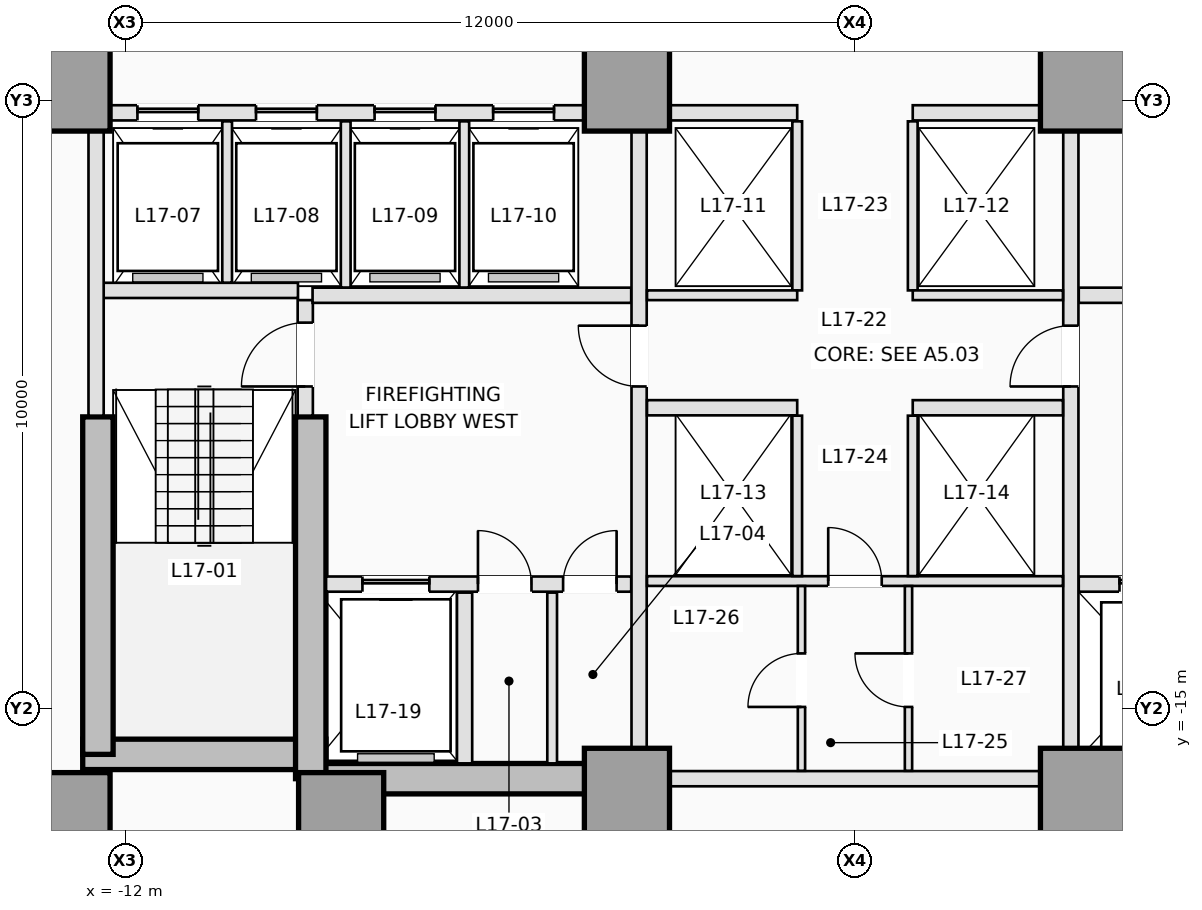
"""IFC4 building model, lengths in metres.
Left out: names, types, materials, properties, quantities, classifications, styles, units other than length and angle.
Written with IfcOpenShell. Run it as: python <this file> out.ifc"""

import sys

from ifc_helpers import new_model, si_unit, direction, frame, frame_2d, origin, origin_2d, place, context, subcontext, project, spatial, rectangle, extrude, element, fill, save


model = new_model("IFC4")
c1 = context("Model", 3, precision=1e-05, world=origin(), true_north=direction((0.0, 1.0)))
c2 = subcontext(c1, "Body", "Model", "MODEL_VIEW")
j1 = project(units=[si_unit("LENGTHUNIT", "METRE"), si_unit("PLANEANGLEUNIT", "RADIAN")], contexts=[c1])
p1 = place(None, origin())
s1 = spatial("IfcSite", under=j1, at=p1, CompositionType="ELEMENT")
p2 = place(p1, origin())
s2 = spatial("IfcBuilding", under=s1, at=p2, CompositionType="ELEMENT")
p3 = place(p2, frame((0.0, 0.0, 66.1)))
s3 = spatial("IfcBuildingStorey", under=s2, at=p3, CompositionType="ELEMENT", Elevation=66.1)
p4 = place(p3, frame((-12.7, -15.75, 0.0), z_axis=(0.0, 0.0, 1.0), x_axis=(1.0, 0.0, 0.0)))
e1 = element("IfcWall", 1, at=p4, inside=s3, PredefinedType="SHEAR", context=c2, shape_type="SweptSolid", body=[
    extrude(rectangle(XDim=4.0, YDim=0.5, at=frame_2d((2.0, 0.0))), origin(), (0.0, 0.0, 1.0), 3.5),
])
for number, where, z_axis, x_axis in (
    (2, (-8.95, -16.15, 0.0), (0.0, 0.0, 1.0), (1.0, 0.0, 0.0)),
    (3, (3.75, -16.15, 0.0), (0.0, 0.0, 1.0), (1.0, 0.0, 0.0)),
):
    element("IfcWall", number, at=place(p3, frame(where, z_axis=z_axis, x_axis=x_axis)), inside=s3, PredefinedType="SHEAR", context=c2, shape_type="SweptSolid", body=[
        extrude(rectangle(XDim=5.2, YDim=0.5, at=frame_2d((2.6, 0.0))), origin(), (0.0, 0.0, 1.0), 3.5),
    ])
p5 = place(p3, frame((-12.45, -15.75, 0.0), z_axis=(0.0, 0.0, 1.0), x_axis=(0.0, 1.0, 0.0)))
e4 = element("IfcWall", 4, at=p5, inside=s3, PredefinedType="SHEAR", context=c2, shape_type="SweptSolid", body=[
    extrude(rectangle(XDim=5.55, YDim=0.5, at=frame_2d((2.775, 0.0))), origin(), (0.0, 0.0, 1.0), 3.5),
])
p6 = place(p3, frame((-8.95, -16.15, 0.0), z_axis=(0.0, 0.0, 1.0), x_axis=(0.0, 1.0, 0.0)))
e5 = element("IfcWall", 5, at=p6, inside=s3, PredefinedType="SHEAR", context=c2, shape_type="SweptSolid", body=[
    extrude(rectangle(XDim=5.95, YDim=0.5, at=frame_2d((2.975, 0.0))), origin(), (0.0, 0.0, 1.0), 3.5),
])
for number, where, z_axis, x_axis in (
    (6, (-12.95, -16.75, 0.0), (0.0, 0.0, 1.0), (1.0, 0.0, 0.0)),
    (7, (-8.45, -16.75, 0.0), (0.0, 0.0, 1.0), (1.0, 0.0, 0.0)),
    (8, (-3.75, -16.35, 0.0), (0.0, 0.0, 1.0), (1.0, 0.0, 0.0)),
    (9, (3.75, -16.35, 0.0), (0.0, 0.0, 1.0), (1.0, 0.0, 0.0)),
    (10, (-12.95, -4.8, 0.0), (0.0, 0.0, 1.0), (1.0, 0.0, 0.0)),
    (11, (-3.75, -4.8, 0.0), (0.0, 0.0, 1.0), (1.0, 0.0, 0.0)),
    (12, (3.75, -4.8, 0.0), (0.0, 0.0, 1.0), (1.0, 0.0, 0.0)),
):
    element("IfcColumn", number, at=place(p3, frame(where, z_axis=z_axis, x_axis=x_axis)), inside=s3, PredefinedType="COLUMN", context=c2, shape_type="SweptSolid", body=[
        extrude(rectangle(XDim=1.4, YDim=1.4, at=origin_2d()), origin(), (0.0, 0.0, 1.0), 3.5),
    ])
p7 = place(p3, frame((-9.04, -10.18, 0.0), z_axis=(0.0, 0.0, 1.0), x_axis=(0.0, 1.0, 0.0)))
e13 = element("IfcWall", 13, at=p7, inside=s3, PredefinedType="PARTITIONING", context=c2, shape_type="SweptSolid", body=[
    extrude(rectangle(XDim=1.9, YDim=0.25, at=frame_2d((0.95, 0.0))), origin(), (0.0, 0.0, 1.0), 3.25),
])
p8 = place(p7, frame((0.48, 0.0, 0.0)))
e14 = element("IfcOpeningElement", 14, at=p8, cuts=e13, PredefinedType="OPENING", context=c2, shape_type="SweptSolid", body=[
    extrude(rectangle(XDim=1.05, YDim=2.15, at=frame_2d((0.525, 1.075))), frame((0.0, 0.135, 0.0), z_axis=(0.0, -1.0, 0.0), x_axis=(1.0, 0.0, 0.0)), (0.0, 0.0, 1.0), 0.27),
])
p9 = place(p3, frame((-12.38, -8.12, 0.0), z_axis=(0.0, 0.0, 1.0), x_axis=(1.0, 0.0, 0.0)))
e15 = element("IfcWall", 15, at=p9, inside=s3, PredefinedType="PARTITIONING", context=c2, shape_type="SweptSolid", body=[
    extrude(rectangle(XDim=3.22, YDim=0.25, at=frame_2d((1.61, 0.0))), origin(), (0.0, 0.0, 1.0), 3.25),
])
p10 = place(p3, frame((-12.48, -10.18, 0.0), z_axis=(0.0, 0.0, 1.0), x_axis=(0.0, 1.0, 0.0)))
e16 = element("IfcWall", 16, at=p10, inside=s3, PredefinedType="PARTITIONING", context=c2, shape_type="SweptSolid", body=[
    extrude(rectangle(XDim=4.678, YDim=0.25, at=frame_2d((2.339, 0.0))), origin(), (0.0, 0.0, 1.0), 3.25),
])
p11 = place(p3, frame((-8.698, -12.95, 0.0), z_axis=(0.0, 0.0, 1.0), x_axis=(1.0, 0.0, 0.0)))
e17 = element("IfcWall", 17, at=p11, inside=s3, PredefinedType="PARTITIONING", context=c2, shape_type="SweptSolid", body=[
    extrude(rectangle(XDim=5.018, YDim=0.25, at=frame_2d((2.509, 0.0))), origin(), (0.0, 0.0, 1.0), 3.25),
])
p12 = place(p11, frame((0.598, 0.0, 0.0)))
e18 = element("IfcOpeningElement", 18, at=p12, cuts=e17, PredefinedType="OPENING", context=c2, shape_type="SweptSolid", body=[
    extrude(rectangle(XDim=1.1, YDim=2.15, at=frame_2d((0.55, 1.075))), frame((0.0, 0.135, 0.0), z_axis=(0.0, -1.0, 0.0), x_axis=(1.0, 0.0, 0.0)), (0.0, 0.0, 1.0), 0.27),
])
p13 = place(p11, frame((2.498, 0.0, 0.0)))
e19 = element("IfcOpeningElement", 19, at=p13, cuts=e17, PredefinedType="OPENING", context=c2, shape_type="SweptSolid", body=[
    extrude(rectangle(XDim=0.88, YDim=2.1, at=frame_2d((0.44, 1.05))), frame((0.0, 0.135, 0.0), z_axis=(0.0, -1.0, 0.0), x_axis=(1.0, 0.0, 0.0)), (0.0, 0.0, 1.0), 0.27),
])
p14 = place(p11, frame((3.898, 0.0, 0.0)))
e20 = element("IfcOpeningElement", 20, at=p14, cuts=e17, PredefinedType="OPENING", context=c2, shape_type="SweptSolid", body=[
    extrude(rectangle(XDim=0.88, YDim=2.1, at=frame_2d((0.44, 1.05))), frame((0.0, 0.135, 0.0), z_axis=(0.0, -1.0, 0.0), x_axis=(1.0, 0.0, 0.0)), (0.0, 0.0, 1.0), 0.27),
])
p15 = place(p3, frame((3.68, -12.95, 0.0), z_axis=(0.0, 0.0, 1.0), x_axis=(1.0, 0.0, 0.0)))
e21 = element("IfcWall", 21, at=p15, inside=s3, PredefinedType="PARTITIONING", context=c2, shape_type="SweptSolid", body=[
    extrude(rectangle(XDim=5.018, YDim=0.25, at=frame_2d((2.509, 0.0))), origin(), (0.0, 0.0, 1.0), 3.25),
])
p16 = place(p15, frame((3.32, 0.0, 0.0)))
e22 = element("IfcOpeningElement", 22, at=p16, cuts=e21, PredefinedType="OPENING", context=c2, shape_type="SweptSolid", body=[
    extrude(rectangle(XDim=1.1, YDim=2.15, at=frame_2d((0.55, 1.075))), frame((0.0, 0.135, 0.0), z_axis=(0.0, -1.0, 0.0), x_axis=(1.0, 0.0, 0.0)), (0.0, 0.0, 1.0), 0.27),
])
p17 = place(p15, frame((0.67, 0.0, 0.0)))
e23 = element("IfcOpeningElement", 23, at=p17, cuts=e21, PredefinedType="OPENING", context=c2, shape_type="SweptSolid", body=[
    extrude(rectangle(XDim=1.2, YDim=2.15, at=frame_2d((0.6, 1.075))), frame((0.0, 0.135, 0.0), z_axis=(0.0, -1.0, 0.0), x_axis=(1.0, 0.0, 0.0)), (0.0, 0.0, 1.0), 0.27),
])
p18 = place(p3, frame((-6.42, -15.898, 0.0), z_axis=(0.0, 0.0, 1.0), x_axis=(0.0, 1.0, 0.0)))
e24 = element("IfcWall", 24, at=p18, inside=s3, PredefinedType="PARTITIONING", context=c2, shape_type="SweptSolid", body=[
    extrude(rectangle(XDim=2.808, YDim=0.25, at=frame_2d((1.404, 0.0))), origin(), (0.0, 0.0, 1.0), 3.25),
])
p19 = place(p3, frame((-4.98, -15.898, 0.0), z_axis=(0.0, 0.0, 1.0), x_axis=(0.0, 1.0, 0.0)))
e25 = element("IfcWall", 25, at=p19, inside=s3, PredefinedType="PARTITIONING", context=c2, shape_type="SweptSolid", body=[
    extrude(rectangle(XDim=2.808, YDim=0.16, at=frame_2d((1.404, 0.0))), origin(), (0.0, 0.0, 1.0), 3.25),
])
for number, where, z_axis, x_axis in (
    (26, (-8.92, -8.2, 0.0), (0.0, 0.0, 1.0), (1.0, 0.0, 0.0)),
    (27, (3.68, -8.2, 0.0), (0.0, 0.0, 1.0), (1.0, 0.0, 0.0)),
):
    element("IfcWall", number, at=place(p3, frame(where, z_axis=z_axis, x_axis=x_axis)), inside=s3, PredefinedType="PARTITIONING", context=c2, shape_type="SweptSolid", body=[
        extrude(rectangle(XDim=5.24, YDim=0.25, at=frame_2d((2.62, 0.0))), origin(), (0.0, 0.0, 1.0), 3.25),
    ])
p20 = place(p3, frame((-3.55, -15.648, 0.0), z_axis=(0.0, 0.0, 1.0), x_axis=(0.0, 1.0, 0.0)))
e28 = element("IfcWall", 28, at=p20, inside=s3, PredefinedType="PARTITIONING", context=c2, shape_type="SweptSolid", body=[
    extrude(rectangle(XDim=10.146, YDim=0.25, at=frame_2d((5.073, 0.0))), origin(), (0.0, 0.0, 1.0), 3.25),
])
p21 = place(p20, frame((5.948, 0.0, 0.0)))
e29 = element("IfcOpeningElement", 29, at=p21, cuts=e28, PredefinedType="OPENING", context=c2, shape_type="SweptSolid", body=[
    extrude(rectangle(XDim=1.0, YDim=2.15, at=frame_2d((0.5, 1.075))), frame((0.0, 0.135, 0.0), z_axis=(0.0, -1.0, 0.0), x_axis=(1.0, 0.0, 0.0)), (0.0, 0.0, 1.0), 0.27),
])
p22 = place(p3, frame((3.55, -15.648, 0.0), z_axis=(0.0, 0.0, 1.0), x_axis=(0.0, 1.0, 0.0)))
e30 = element("IfcWall", 30, at=p22, inside=s3, PredefinedType="PARTITIONING", context=c2, shape_type="SweptSolid", body=[
    extrude(rectangle(XDim=10.146, YDim=0.25, at=frame_2d((5.073, 0.0))), origin(), (0.0, 0.0, 1.0), 3.25),
])
p23 = place(p22, frame((5.948, 0.0, 0.0)))
e31 = element("IfcOpeningElement", 31, at=p23, cuts=e30, PredefinedType="OPENING", context=c2, shape_type="SweptSolid", body=[
    extrude(rectangle(XDim=1.0, YDim=2.15, at=frame_2d((0.5, 1.075))), frame((0.0, 0.135, 0.0), z_axis=(0.0, -1.0, 0.0), x_axis=(1.0, 0.0, 0.0)), (0.0, 0.0, 1.0), 0.27),
])
p24 = place(p3, frame((-12.248, -5.2, 0.0), z_axis=(0.0, 0.0, 1.0), x_axis=(1.0, 0.0, 0.0)))
e32 = element("IfcWall", 32, at=p24, inside=s3, PredefinedType="PARTITIONING", context=c2, shape_type="SweptSolid", body=[
    extrude(rectangle(XDim=7.796, YDim=0.25, at=frame_2d((3.898, 0.0))), origin(), (0.0, 0.0, 1.0), 3.25),
])
p25 = place(p24, frame((0.448, 0.0, 0.0)))
e33 = element("IfcOpeningElement", 33, at=p25, cuts=e32, PredefinedType="OPENING", context=c2, shape_type="SweptSolid", body=[
    extrude(rectangle(XDim=1.0, YDim=2.15, at=frame_2d((0.5, 1.075))), frame((0.0, 0.135, 0.0), z_axis=(0.0, -1.0, 0.0), x_axis=(1.0, 0.0, 0.0)), (0.0, 0.0, 1.0), 0.27),
])
p26 = place(p24, frame((2.398, 0.0, 0.0)))
e34 = element("IfcOpeningElement", 34, at=p26, cuts=e32, PredefinedType="OPENING", context=c2, shape_type="SweptSolid", body=[
    extrude(rectangle(XDim=1.0, YDim=2.15, at=frame_2d((0.5, 1.075))), frame((0.0, 0.135, 0.0), z_axis=(0.0, -1.0, 0.0), x_axis=(1.0, 0.0, 0.0)), (0.0, 0.0, 1.0), 0.27),
])
p27 = place(p24, frame((4.348, 0.0, 0.0)))
e35 = element("IfcOpeningElement", 35, at=p27, cuts=e32, PredefinedType="OPENING", context=c2, shape_type="SweptSolid", body=[
    extrude(rectangle(XDim=1.0, YDim=2.15, at=frame_2d((0.5, 1.075))), frame((0.0, 0.135, 0.0), z_axis=(0.0, -1.0, 0.0), x_axis=(1.0, 0.0, 0.0)), (0.0, 0.0, 1.0), 0.27),
])
p28 = place(p24, frame((6.298, 0.0, 0.0)))
e36 = element("IfcOpeningElement", 36, at=p28, cuts=e32, PredefinedType="OPENING", context=c2, shape_type="SweptSolid", body=[
    extrude(rectangle(XDim=1.0, YDim=2.15, at=frame_2d((0.5, 1.075))), frame((0.0, 0.135, 0.0), z_axis=(0.0, -1.0, 0.0), x_axis=(1.0, 0.0, 0.0)), (0.0, 0.0, 1.0), 0.27),
])
for number, where, z_axis, x_axis in (
    (37, (-3.048, -5.2, 0.0), (0.0, 0.0, 1.0), (1.0, 0.0, 0.0)),
    (38, (0.95, -5.2, 0.0), (0.0, 0.0, 1.0), (1.0, 0.0, 0.0)),
):
    element("IfcWall", number, at=place(p3, frame(where, z_axis=z_axis, x_axis=x_axis)), inside=s3, PredefinedType="PARTITIONING", context=c2, shape_type="SweptSolid", body=[
        extrude(rectangle(XDim=2.098, YDim=0.25, at=frame_2d((1.049, 0.0))), origin(), (0.0, 0.0, 1.0), 3.25),
    ])
p29 = place(p3, frame((-10.325, -7.993, 0.0), z_axis=(0.0, 0.0, 1.0), x_axis=(0.0, 1.0, 0.0)))
e39 = element("IfcWall", 39, at=p29, inside=s3, PredefinedType="PARTITIONING", context=c2, shape_type="SweptSolid", body=[
    extrude(rectangle(XDim=2.653, YDim=0.16, at=frame_2d((1.326, 0.0))), origin(), (0.0, 0.0, 1.0), 3.25),
])
for number, where, z_axis, x_axis in (
    (40, (-8.375, -8.073, 0.0), (0.0, 0.0, 1.0), (0.0, 1.0, 0.0)),
    (41, (-6.425, -8.073, 0.0), (0.0, 0.0, 1.0), (0.0, 1.0, 0.0)),
):
    element("IfcWall", number, at=place(p3, frame(where, z_axis=z_axis, x_axis=x_axis)), inside=s3, PredefinedType="PARTITIONING", context=c2, shape_type="SweptSolid", body=[
        extrude(rectangle(XDim=2.733, YDim=0.16, at=frame_2d((1.366, 0.0))), origin(), (0.0, 0.0, 1.0), 3.25),
    ])
p30 = place(p3, frame((-3.048, -16.15, 0.0), z_axis=(0.0, 0.0, 1.0), x_axis=(1.0, 0.0, 0.0)))
e42 = element("IfcWall", 42, at=p30, inside=s3, PredefinedType="PARTITIONING", context=c2, shape_type="SweptSolid", body=[
    extrude(rectangle(XDim=6.096, YDim=0.25, at=frame_2d((3.048, 0.0))), origin(), (0.0, 0.0, 1.0), 2.3),
])
for number, where, z_axis, x_axis in (
    (43, (-0.95, -8.12, 0.0), (0.0, 0.0, 1.0), (0.0, 1.0, 0.0)),
    (44, (0.95, -8.12, 0.0), (0.0, 0.0, 1.0), (0.0, 1.0, 0.0)),
):
    element("IfcWall", number, at=place(p3, frame(where, z_axis=z_axis, x_axis=x_axis)), inside=s3, PredefinedType="PARTITIONING", context=c2, shape_type="SweptSolid", body=[
        extrude(rectangle(XDim=2.78, YDim=0.16, at=frame_2d((1.39, 0.0))), origin(), (0.0, 0.0, 1.0), 3.25),
    ])
for number, where, z_axis, x_axis in (
    (45, (-3.42, -8.2, 0.0), (0.0, 0.0, 1.0), (1.0, 0.0, 0.0)),
    (46, (0.95, -8.2, 0.0), (0.0, 0.0, 1.0), (1.0, 0.0, 0.0)),
):
    element("IfcWall", number, at=place(p3, frame(where, z_axis=z_axis, x_axis=x_axis)), inside=s3, PredefinedType="PARTITIONING", context=c2, shape_type="SweptSolid", body=[
        extrude(rectangle(XDim=2.47, YDim=0.16, at=frame_2d((1.235, 0.0))), origin(), (0.0, 0.0, 1.0), 3.25),
    ])
for number, where, z_axis, x_axis in (
    (47, (-3.42, -10.05, 0.0), (0.0, 0.0, 1.0), (1.0, 0.0, 0.0)),
    (48, (0.95, -10.05, 0.0), (0.0, 0.0, 1.0), (1.0, 0.0, 0.0)),
):
    element("IfcWall", number, at=place(p3, frame(where, z_axis=z_axis, x_axis=x_axis)), inside=s3, PredefinedType="PARTITIONING", context=c2, shape_type="SweptSolid", body=[
        extrude(rectangle(XDim=2.47, YDim=0.25, at=frame_2d((1.235, 0.0))), origin(), (0.0, 0.0, 1.0), 3.25),
    ])
p31 = place(p3, frame((-3.42, -12.9, 0.0), z_axis=(0.0, 0.0, 1.0), x_axis=(1.0, 0.0, 0.0)))
e49 = element("IfcWall", 49, at=p31, inside=s3, PredefinedType="PARTITIONING", context=c2, shape_type="SweptSolid", body=[
    extrude(rectangle(XDim=6.84, YDim=0.16, at=frame_2d((3.42, 0.0))), origin(), (0.0, 0.0, 1.0), 3.25),
])
p32 = place(p31, frame((2.98, 0.0, 0.0)))
e50 = element("IfcOpeningElement", 50, at=p32, cuts=e49, PredefinedType="OPENING", context=c2, shape_type="SweptSolid", body=[
    extrude(rectangle(XDim=0.88, YDim=2.12, at=frame_2d((0.44, 1.06))), frame((0.0, 0.09, 0.0), z_axis=(0.0, -1.0, 0.0), x_axis=(1.0, 0.0, 0.0)), (0.0, 0.0, 1.0), 0.18),
])
for number, where, z_axis, x_axis in (
    (51, (-0.95, -12.818, 0.0), (0.0, 0.0, 1.0), (0.0, 1.0, 0.0)),
    (52, (0.95, -12.818, 0.0), (0.0, 0.0, 1.0), (0.0, 1.0, 0.0)),
):
    element("IfcWall", number, at=place(p3, frame(where, z_axis=z_axis, x_axis=x_axis)), inside=s3, PredefinedType="PARTITIONING", context=c2, shape_type="SweptSolid", body=[
        extrude(rectangle(XDim=2.638, YDim=0.16, at=frame_2d((1.319, 0.0))), origin(), (0.0, 0.0, 1.0), 3.25),
    ])
p33 = place(p3, frame((-0.88, -16.02, 0.0), z_axis=(0.0, 0.0, 1.0), x_axis=(0.0, 1.0, 0.0)))
e53 = element("IfcWall", 53, at=p33, inside=s3, PredefinedType="PARTITIONING", context=c2, shape_type="SweptSolid", body=[
    extrude(rectangle(XDim=3.038, YDim=0.12, at=frame_2d((1.519, 0.0))), origin(), (0.0, 0.0, 1.0), 3.25),
])
p34 = place(p33, frame((1.05, 0.0, 0.0)))
e54 = element("IfcOpeningElement", 54, at=p34, cuts=e53, PredefinedType="OPENING", context=c2, shape_type="SweptSolid", body=[
    extrude(rectangle(XDim=0.88, YDim=2.12, at=frame_2d((0.44, 1.06))), frame((0.0, 0.07, 0.0), z_axis=(0.0, -1.0, 0.0), x_axis=(1.0, 0.0, 0.0)), (0.0, 0.0, 1.0), 0.14),
])
p35 = place(p3, frame((0.88, -16.02, 0.0), z_axis=(0.0, 0.0, 1.0), x_axis=(0.0, 1.0, 0.0)))
e55 = element("IfcWall", 55, at=p35, inside=s3, PredefinedType="PARTITIONING", context=c2, shape_type="SweptSolid", body=[
    extrude(rectangle(XDim=3.038, YDim=0.12, at=frame_2d((1.519, 0.0))), origin(), (0.0, 0.0, 1.0), 3.25),
])
p36 = place(p35, frame((1.05, 0.0, 0.0)))
e56 = element("IfcOpeningElement", 56, at=p36, cuts=e55, PredefinedType="OPENING", context=c2, shape_type="SweptSolid", body=[
    extrude(rectangle(XDim=0.88, YDim=2.12, at=frame_2d((0.44, 1.06))), frame((0.0, 0.07, 0.0), z_axis=(0.0, -1.0, 0.0), x_axis=(1.0, 0.0, 0.0)), (0.0, 0.0, 1.0), 0.14),
])
p37 = place(p25, origin())
e57 = element("IfcDoor", 57, at=p37, inside=s3, OperationType="SLIDING_TO_LEFT", PredefinedType="DOOR", context=c2, shape_type="SweptSolid", body=[
    extrude(rectangle(XDim=1.0, YDim=2.15, at=frame_2d((0.5, 1.075))), frame((0.0, 0.025, 0.0), z_axis=(0.0, -1.0, 0.0), x_axis=(1.0, 0.0, 0.0)), (0.0, 0.0, 1.0), 0.05),
])
fill(e33, e57)
p38 = place(p26, origin())
e58 = element("IfcDoor", 58, at=p38, inside=s3, OperationType="SLIDING_TO_LEFT", PredefinedType="DOOR", context=c2, shape_type="SweptSolid", body=[
    extrude(rectangle(XDim=1.0, YDim=2.15, at=frame_2d((0.5, 1.075))), frame((0.0, 0.025, 0.0), z_axis=(0.0, -1.0, 0.0), x_axis=(1.0, 0.0, 0.0)), (0.0, 0.0, 1.0), 0.05),
])
fill(e34, e58)
p39 = place(p27, origin())
e59 = element("IfcDoor", 59, at=p39, inside=s3, OperationType="SLIDING_TO_LEFT", PredefinedType="DOOR", context=c2, shape_type="SweptSolid", body=[
    extrude(rectangle(XDim=1.0, YDim=2.15, at=frame_2d((0.5, 1.075))), frame((0.0, 0.025, 0.0), z_axis=(0.0, -1.0, 0.0), x_axis=(1.0, 0.0, 0.0)), (0.0, 0.0, 1.0), 0.05),
])
fill(e35, e59)
p40 = place(p28, origin())
e60 = element("IfcDoor", 60, at=p40, inside=s3, OperationType="SLIDING_TO_LEFT", PredefinedType="DOOR", context=c2, shape_type="SweptSolid", body=[
    extrude(rectangle(XDim=1.0, YDim=2.15, at=frame_2d((0.5, 1.075))), frame((0.0, 0.025, 0.0), z_axis=(0.0, -1.0, 0.0), x_axis=(1.0, 0.0, 0.0)), (0.0, 0.0, 1.0), 0.05),
])
fill(e36, e60)
p41 = place(p12, origin())
e61 = element("IfcDoor", 61, at=p41, inside=s3, OperationType="SLIDING_TO_LEFT", PredefinedType="DOOR", context=c2, shape_type="SweptSolid", body=[
    extrude(rectangle(XDim=1.1, YDim=2.15, at=frame_2d((0.55, 1.075))), frame((0.0, 0.025, 0.0), z_axis=(0.0, -1.0, 0.0), x_axis=(1.0, 0.0, 0.0)), (0.0, 0.0, 1.0), 0.05),
])
fill(e18, e61)
p42 = place(p17, origin())
e62 = element("IfcDoor", 62, at=p42, inside=s3, OperationType="SLIDING_TO_LEFT", PredefinedType="DOOR", context=c2, shape_type="SweptSolid", body=[
    extrude(rectangle(XDim=1.2, YDim=2.15, at=frame_2d((0.6, 1.075))), frame((0.0, 0.025, 0.0), z_axis=(0.0, -1.0, 0.0), x_axis=(1.0, 0.0, 0.0)), (0.0, 0.0, 1.0), 0.05),
])
fill(e23, e62)
p43 = place(p8, origin())
e63 = element("IfcDoor", 63, at=p43, inside=s3, OperationType="SINGLE_SWING_LEFT", PredefinedType="DOOR", context=c2, shape_type="SweptSolid", body=[
    extrude(rectangle(XDim=1.05, YDim=2.15, at=frame_2d((0.525, 1.075))), frame((0.0, 0.025, 0.0), z_axis=(0.0, -1.0, 0.0), x_axis=(1.0, 0.0, 0.0)), (0.0, 0.0, 1.0), 0.05),
])
fill(e14, e63)
p44 = place(p13, origin())
e64 = element("IfcDoor", 64, at=p44, inside=s3, OperationType="SINGLE_SWING_LEFT", PredefinedType="TRAPDOOR", context=c2, shape_type="SweptSolid", body=[
    extrude(rectangle(XDim=0.88, YDim=2.1, at=frame_2d((0.44, 1.05))), frame((0.0, 0.025, 0.0), z_axis=(0.0, -1.0, 0.0), x_axis=(1.0, 0.0, 0.0)), (0.0, 0.0, 1.0), 0.05),
])
fill(e19, e64)
p45 = place(p14, origin())
e65 = element("IfcDoor", 65, at=p45, inside=s3, OperationType="SINGLE_SWING_RIGHT", PredefinedType="TRAPDOOR", context=c2, shape_type="SweptSolid", body=[
    extrude(rectangle(XDim=0.88, YDim=2.1, at=frame_2d((0.44, 1.05))), frame((0.0, 0.025, 0.0), z_axis=(0.0, -1.0, 0.0), x_axis=(1.0, 0.0, 0.0)), (0.0, 0.0, 1.0), 0.05),
])
fill(e20, e65)
p46 = place(p21, origin())
e66 = element("IfcDoor", 66, at=p46, inside=s3, OperationType="SINGLE_SWING_RIGHT", PredefinedType="DOOR", context=c2, shape_type="SweptSolid", body=[
    extrude(rectangle(XDim=1.0, YDim=2.15, at=frame_2d((0.5, 1.075))), frame((0.0, 0.025, 0.0), z_axis=(0.0, -1.0, 0.0), x_axis=(1.0, 0.0, 0.0)), (0.0, 0.0, 1.0), 0.05),
])
fill(e29, e66)
p47 = place(p23, origin())
e67 = element("IfcDoor", 67, at=p47, inside=s3, OperationType="SINGLE_SWING_LEFT", PredefinedType="DOOR", context=c2, shape_type="SweptSolid", body=[
    extrude(rectangle(XDim=1.0, YDim=2.15, at=frame_2d((0.5, 1.075))), frame((0.0, 0.025, 0.0), z_axis=(0.0, -1.0, 0.0), x_axis=(1.0, 0.0, 0.0)), (0.0, 0.0, 1.0), 0.05),
])
fill(e31, e67)
p48 = place(p32, origin())
e68 = element("IfcDoor", 68, at=p48, inside=s3, OperationType="SINGLE_SWING_LEFT", PredefinedType="DOOR", context=c2, shape_type="SweptSolid", body=[
    extrude(rectangle(XDim=0.88, YDim=2.12, at=frame_2d((0.44, 1.06))), frame((0.0, 0.025, 0.0), z_axis=(0.0, -1.0, 0.0), x_axis=(1.0, 0.0, 0.0)), (0.0, 0.0, 1.0), 0.05),
])
fill(e50, e68)
p49 = place(p34, origin())
e69 = element("IfcDoor", 69, at=p49, inside=s3, OperationType="SINGLE_SWING_LEFT", PredefinedType="DOOR", context=c2, shape_type="SweptSolid", body=[
    extrude(rectangle(XDim=0.88, YDim=2.12, at=frame_2d((0.44, 1.06))), frame((0.0, 0.025, 0.0), z_axis=(0.0, -1.0, 0.0), x_axis=(1.0, 0.0, 0.0)), (0.0, 0.0, 1.0), 0.05),
])
fill(e54, e69)
p50 = place(p36, origin())
e70 = element("IfcDoor", 70, at=p50, inside=s3, OperationType="SINGLE_SWING_RIGHT", PredefinedType="DOOR", context=c2, shape_type="SweptSolid", body=[
    extrude(rectangle(XDim=0.88, YDim=2.12, at=frame_2d((0.44, 1.06))), frame((0.0, 0.025, 0.0), z_axis=(0.0, -1.0, 0.0), x_axis=(1.0, 0.0, 0.0)), (0.0, 0.0, 1.0), 0.05),
])
fill(e56, e70)
save(model, sys.argv[1])
